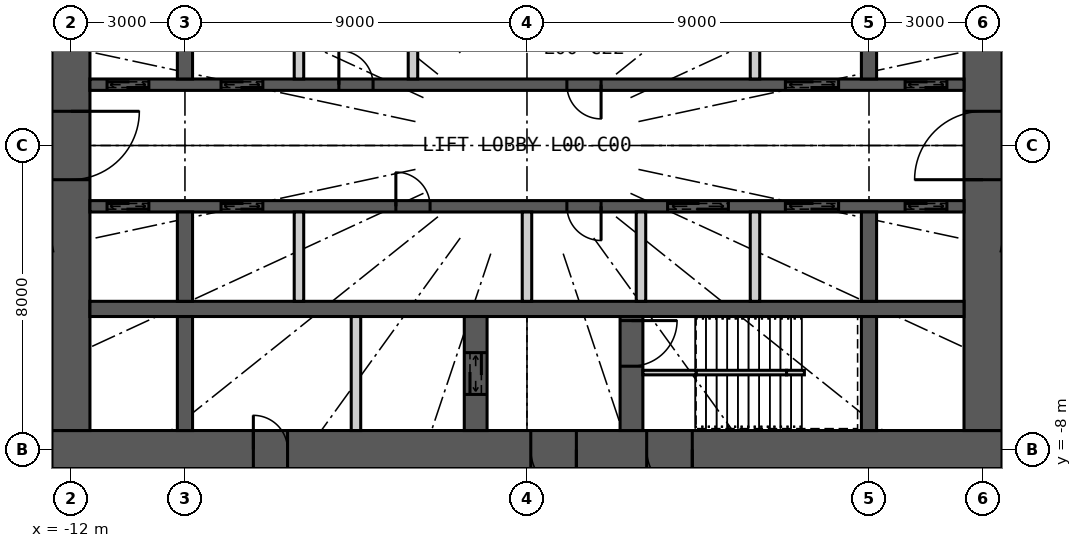
"""IFC4 building model, lengths in metres.
Left out: names, types, materials, properties, quantities, classifications, styles, units other than length and angle.
Written with IfcOpenShell. Run it as: python <this file> out.ifc"""

import sys

from ifc_helpers import new_model, si_unit, direction, frame, frame_2d, origin, place, context, subcontext, project, spatial, rectangle, extrude, element, fill, save


model = new_model("IFC4")
c1 = context("Model", 3, precision=1e-05, world=origin(), true_north=direction((0.0, 1.0)))
c2 = subcontext(c1, "Body", "Model", "MODEL_VIEW")
j1 = project(units=[si_unit("LENGTHUNIT", "METRE"), si_unit("PLANEANGLEUNIT", "RADIAN")], contexts=[c1])
p1 = place(None, origin())
s1 = spatial("IfcSite", under=j1, at=p1, CompositionType="ELEMENT")
p2 = place(p1, origin())
s2 = spatial("IfcBuilding", under=s1, at=p2, CompositionType="ELEMENT")
p3 = place(p2, origin())
s3 = spatial("IfcBuildingStorey", under=s2, at=p3, CompositionType="ELEMENT", Elevation=0.0)
p4 = place(p3, frame((12.5, -8.0, 0.0), z_axis=(0.0, 0.0, 1.0), x_axis=(-1.0, 0.0, 0.0)))
e1 = element("IfcWall", 1, at=p4, inside=s3, PredefinedType="SHEAR", context=c2, shape_type="SweptSolid", body=[
    extrude(rectangle(XDim=25.0, YDim=1.0, at=frame_2d((12.5, 0.0))), origin(), (0.0, 0.0, 1.0), 7.2),
])
p5 = place(p4, frame((11.2, 0.0, 0.0)))
e2 = element("IfcOpeningElement", 2, at=p5, cuts=e1, PredefinedType="OPENING", context=c2, shape_type="SweptSolid", body=[
    extrude(rectangle(XDim=1.2, YDim=2.2, at=frame_2d((0.6, 1.1))), frame((0.0, 0.51, 0.0), z_axis=(0.0, -1.0, 0.0), x_axis=(1.0, 0.0, 0.0)), (0.0, 0.0, 1.0), 1.02),
])
p6 = place(p4, frame((8.15, 0.0, 0.0)))
e3 = element("IfcOpeningElement", 3, at=p6, cuts=e1, PredefinedType="OPENING", context=c2, shape_type="SweptSolid", body=[
    extrude(rectangle(XDim=1.2, YDim=2.2, at=frame_2d((0.6, 1.1))), frame((0.0, 0.51, 0.0), z_axis=(0.0, -1.0, 0.0), x_axis=(1.0, 0.0, 0.0)), (0.0, 0.0, 1.0), 1.02),
])
p7 = place(p4, frame((18.8, 0.0, 0.0)))
e4 = element("IfcOpeningElement", 4, at=p7, cuts=e1, PredefinedType="OPENING", context=c2, shape_type="SweptSolid", body=[
    extrude(rectangle(XDim=0.9, YDim=2.2, at=frame_2d((0.45, 1.1))), frame((0.0, 0.51, 0.0), z_axis=(0.0, -1.0, 0.0), x_axis=(1.0, 0.0, 0.0)), (0.0, 0.0, 1.0), 1.02),
])
p8 = place(p3, frame((12.0, -7.5, 0.0), z_axis=(0.0, 0.0, 1.0), x_axis=(0.0, 1.0, 0.0)))
e5 = element("IfcWall", 5, at=p8, inside=s3, PredefinedType="SHEAR", context=c2, shape_type="SweptSolid", body=[
    extrude(rectangle(XDim=15.0, YDim=1.0, at=frame_2d((7.5, 0.0))), origin(), (0.0, 0.0, 1.0), 7.2),
])
p9 = place(p8, frame((6.6, 0.0, 0.0)))
e6 = element("IfcOpeningElement", 6, at=p9, cuts=e5, PredefinedType="OPENING", context=c2, shape_type="SweptSolid", body=[
    extrude(rectangle(XDim=1.8, YDim=2.2, at=frame_2d((0.9, 1.1))), frame((0.0, 0.51, 0.0), z_axis=(0.0, -1.0, 0.0), x_axis=(1.0, 0.0, 0.0)), (0.0, 0.0, 1.0), 1.02),
])
p10 = place(p3, frame((-12.0, 7.5, 0.0), z_axis=(0.0, 0.0, 1.0), x_axis=(0.0, -1.0, 0.0)))
e7 = element("IfcWall", 7, at=p10, inside=s3, PredefinedType="SHEAR", context=c2, shape_type="SweptSolid", body=[
    extrude(rectangle(XDim=15.0, YDim=1.0, at=frame_2d((7.5, 0.0))), origin(), (0.0, 0.0, 1.0), 7.2),
])
p11 = place(p10, frame((6.6, 0.0, 0.0)))
e8 = element("IfcOpeningElement", 8, at=p11, cuts=e7, PredefinedType="OPENING", context=c2, shape_type="SweptSolid", body=[
    extrude(rectangle(XDim=1.8, YDim=2.2, at=frame_2d((0.9, 1.1))), frame((0.0, 0.51, 0.0), z_axis=(0.0, -1.0, 0.0), x_axis=(1.0, 0.0, 0.0)), (0.0, 0.0, 1.0), 1.02),
])
p12 = place(p3, frame((-11.5, 1.6, 0.0), z_axis=(0.0, 0.0, 1.0), x_axis=(1.0, 0.0, 0.0)))
e9 = element("IfcWall", 9, at=p12, inside=s3, PredefinedType="SHEAR", context=c2, shape_type="SweptSolid", body=[
    extrude(rectangle(XDim=23.0, YDim=0.3, at=frame_2d((11.5, 0.0))), origin(), (0.0, 0.0, 1.0), 7.2),
])
p13 = place(p12, frame((0.45, 0.0, 0.0)))
e10 = element("IfcOpeningElement", 10, at=p13, cuts=e9, PredefinedType="OPENING", context=c2, shape_type="SweptSolid", body=[
    extrude(rectangle(XDim=1.1, YDim=2.2, at=frame_2d((0.55, 1.1))), frame((0.0, 0.16, 0.0), z_axis=(0.0, -1.0, 0.0), x_axis=(1.0, 0.0, 0.0)), (0.0, 0.0, 1.0), 0.32),
])
p14 = place(p12, frame((3.45, 0.0, 0.0)))
e11 = element("IfcOpeningElement", 11, at=p14, cuts=e9, PredefinedType="OPENING", context=c2, shape_type="SweptSolid", body=[
    extrude(rectangle(XDim=1.1, YDim=2.2, at=frame_2d((0.55, 1.1))), frame((0.0, 0.16, 0.0), z_axis=(0.0, -1.0, 0.0), x_axis=(1.0, 0.0, 0.0)), (0.0, 0.0, 1.0), 0.32),
])
p15 = place(p12, frame((18.3, 0.0, 0.0)))
e12 = element("IfcOpeningElement", 12, at=p15, cuts=e9, PredefinedType="OPENING", context=c2, shape_type="SweptSolid", body=[
    extrude(rectangle(XDim=1.4, YDim=2.4, at=frame_2d((0.7, 1.2))), frame((0.0, 0.16, 0.0), z_axis=(0.0, -1.0, 0.0), x_axis=(1.0, 0.0, 0.0)), (0.0, 0.0, 1.0), 0.32),
])
p16 = place(p12, frame((21.45, 0.0, 0.0)))
e13 = element("IfcOpeningElement", 13, at=p16, cuts=e9, PredefinedType="OPENING", context=c2, shape_type="SweptSolid", body=[
    extrude(rectangle(XDim=1.1, YDim=2.2, at=frame_2d((0.55, 1.1))), frame((0.0, 0.16, 0.0), z_axis=(0.0, -1.0, 0.0), x_axis=(1.0, 0.0, 0.0)), (0.0, 0.0, 1.0), 0.32),
])
p17 = place(p12, frame((6.55, 0.0, 0.0)))
e14 = element("IfcOpeningElement", 14, at=p17, cuts=e9, PredefinedType="OPENING", context=c2, shape_type="SweptSolid", body=[
    extrude(rectangle(XDim=0.9, YDim=2.2, at=frame_2d((0.45, 1.1))), frame((0.0, 0.16, 0.0), z_axis=(0.0, -1.0, 0.0), x_axis=(1.0, 0.0, 0.0)), (0.0, 0.0, 1.0), 0.32),
])
p18 = place(p12, frame((12.55, 0.0, 0.0)))
e15 = element("IfcOpeningElement", 15, at=p18, cuts=e9, PredefinedType="OPENING", context=c2, shape_type="SweptSolid", body=[
    extrude(rectangle(XDim=0.9, YDim=2.2, at=frame_2d((0.45, 1.1))), frame((0.0, 0.16, 0.0), z_axis=(0.0, -1.0, 0.0), x_axis=(1.0, 0.0, 0.0)), (0.0, 0.0, 1.0), 0.32),
])
p19 = place(p3, frame((-11.5, -4.3, 0.0), z_axis=(0.0, 0.0, 1.0), x_axis=(1.0, 0.0, 0.0)))
e16 = element("IfcWall", 16, at=p19, inside=s3, PredefinedType="SHEAR", context=c2, shape_type="SweptSolid", body=[
    extrude(rectangle(XDim=23.0, YDim=0.4, at=frame_2d((11.5, 0.0))), origin(), (0.0, 0.0, 1.0), 7.2),
])
p20 = place(p3, frame((-11.5, -1.6, 0.0), z_axis=(0.0, 0.0, 1.0), x_axis=(1.0, 0.0, 0.0)))
e17 = element("IfcWall", 17, at=p20, inside=s3, PredefinedType="SHEAR", context=c2, shape_type="SweptSolid", body=[
    extrude(rectangle(XDim=23.0, YDim=0.3, at=frame_2d((11.5, 0.0))), origin(), (0.0, 0.0, 1.0), 7.2),
])
p21 = place(p20, frame((0.45, 0.0, 0.0)))
e18 = element("IfcOpeningElement", 18, at=p21, cuts=e17, PredefinedType="OPENING", context=c2, shape_type="SweptSolid", body=[
    extrude(rectangle(XDim=1.1, YDim=2.2, at=frame_2d((0.55, 1.1))), frame((0.0, 0.16, 0.0), z_axis=(0.0, -1.0, 0.0), x_axis=(1.0, 0.0, 0.0)), (0.0, 0.0, 1.0), 0.32),
])
p22 = place(p20, frame((3.45, 0.0, 0.0)))
e19 = element("IfcOpeningElement", 19, at=p22, cuts=e17, PredefinedType="OPENING", context=c2, shape_type="SweptSolid", body=[
    extrude(rectangle(XDim=1.1, YDim=2.2, at=frame_2d((0.55, 1.1))), frame((0.0, 0.16, 0.0), z_axis=(0.0, -1.0, 0.0), x_axis=(1.0, 0.0, 0.0)), (0.0, 0.0, 1.0), 0.32),
])
p23 = place(p20, frame((15.2, 0.0, 0.0)))
e20 = element("IfcOpeningElement", 20, at=p23, cuts=e17, PredefinedType="OPENING", context=c2, shape_type="SweptSolid", body=[
    extrude(rectangle(XDim=1.6, YDim=2.4, at=frame_2d((0.8, 1.2))), frame((0.0, 0.16, 0.0), z_axis=(0.0, -1.0, 0.0), x_axis=(1.0, 0.0, 0.0)), (0.0, 0.0, 1.0), 0.32),
])
p24 = place(p20, frame((18.3, 0.0, 0.0)))
e21 = element("IfcOpeningElement", 21, at=p24, cuts=e17, PredefinedType="OPENING", context=c2, shape_type="SweptSolid", body=[
    extrude(rectangle(XDim=1.4, YDim=2.4, at=frame_2d((0.7, 1.2))), frame((0.0, 0.16, 0.0), z_axis=(0.0, -1.0, 0.0), x_axis=(1.0, 0.0, 0.0)), (0.0, 0.0, 1.0), 0.32),
])
p25 = place(p20, frame((21.45, 0.0, 0.0)))
e22 = element("IfcOpeningElement", 22, at=p25, cuts=e17, PredefinedType="OPENING", context=c2, shape_type="SweptSolid", body=[
    extrude(rectangle(XDim=1.1, YDim=2.2, at=frame_2d((0.55, 1.1))), frame((0.0, 0.16, 0.0), z_axis=(0.0, -1.0, 0.0), x_axis=(1.0, 0.0, 0.0)), (0.0, 0.0, 1.0), 0.32),
])
p26 = place(p20, frame((8.05, 0.0, 0.0)))
e23 = element("IfcOpeningElement", 23, at=p26, cuts=e17, PredefinedType="OPENING", context=c2, shape_type="SweptSolid", body=[
    extrude(rectangle(XDim=0.9, YDim=2.2, at=frame_2d((0.45, 1.1))), frame((0.0, 0.16, 0.0), z_axis=(0.0, -1.0, 0.0), x_axis=(1.0, 0.0, 0.0)), (0.0, 0.0, 1.0), 0.32),
])
p27 = place(p20, frame((12.55, 0.0, 0.0)))
e24 = element("IfcOpeningElement", 24, at=p27, cuts=e17, PredefinedType="OPENING", context=c2, shape_type="SweptSolid", body=[
    extrude(rectangle(XDim=0.9, YDim=2.2, at=frame_2d((0.45, 1.1))), frame((0.0, 0.16, 0.0), z_axis=(0.0, -1.0, 0.0), x_axis=(1.0, 0.0, 0.0)), (0.0, 0.0, 1.0), 0.32),
])
for number, where, z_axis, x_axis in (
    (25, (-9.0, 1.75, 0.0), (0.0, 0.0, 1.0), (0.0, 1.0, 0.0)),
    (26, (-9.0, -4.1, 0.0), (0.0, 0.0, 1.0), (0.0, 1.0, 0.0)),
):
    element("IfcWall", number, at=place(p3, frame(where, z_axis=z_axis, x_axis=x_axis)), inside=s3, PredefinedType="SHEAR", context=c2, shape_type="SweptSolid", body=[
        extrude(rectangle(XDim=2.35, YDim=0.4, at=frame_2d((1.175, 0.0))), origin(), (0.0, 0.0, 1.0), 7.2),
    ])
p28 = place(p3, frame((-9.0, -7.5, 0.0), z_axis=(0.0, 0.0, 1.0), x_axis=(0.0, 1.0, 0.0)))
e27 = element("IfcWall", 27, at=p28, inside=s3, PredefinedType="SHEAR", context=c2, shape_type="SweptSolid", body=[
    extrude(rectangle(XDim=3.0, YDim=0.4, at=frame_2d((1.5, 0.0))), origin(), (0.0, 0.0, 1.0), 7.2),
])
for number, where, z_axis, x_axis in (
    (28, (9.0, 1.75, 0.0), (0.0, 0.0, 1.0), (0.0, 1.0, 0.0)),
    (29, (9.0, -4.1, 0.0), (0.0, 0.0, 1.0), (0.0, 1.0, 0.0)),
):
    element("IfcWall", number, at=place(p3, frame(where, z_axis=z_axis, x_axis=x_axis)), inside=s3, PredefinedType="SHEAR", context=c2, shape_type="SweptSolid", body=[
        extrude(rectangle(XDim=2.35, YDim=0.4, at=frame_2d((1.175, 0.0))), origin(), (0.0, 0.0, 1.0), 7.2),
    ])
p29 = place(p3, frame((9.0, -7.5, 0.0), z_axis=(0.0, 0.0, 1.0), x_axis=(0.0, 1.0, 0.0)))
e30 = element("IfcWall", 30, at=p29, inside=s3, PredefinedType="SHEAR", context=c2, shape_type="SweptSolid", body=[
    extrude(rectangle(XDim=3.0, YDim=0.4, at=frame_2d((1.5, 0.0))), origin(), (0.0, 0.0, 1.0), 7.2),
])
p30 = place(p3, frame((2.75, -7.5, 0.0), z_axis=(0.0, 0.0, 1.0), x_axis=(0.0, 1.0, 0.0)))
e31 = element("IfcWall", 31, at=p30, inside=s3, PredefinedType="SHEAR", context=c2, shape_type="SweptSolid", body=[
    extrude(rectangle(XDim=3.0, YDim=0.6, at=frame_2d((1.5, 0.0))), origin(), (0.0, 0.0, 1.0), 7.2),
])
p31 = place(p30, frame((1.692, 0.0, 0.0)))
e32 = element("IfcOpeningElement", 32, at=p31, cuts=e31, PredefinedType="OPENING", context=c2, shape_type="SweptSolid", body=[
    extrude(rectangle(XDim=1.2, YDim=2.2, at=frame_2d((0.6, 1.1))), frame((0.0, 0.31, 0.0), z_axis=(0.0, -1.0, 0.0), x_axis=(1.0, 0.0, 0.0)), (0.0, 0.0, 1.0), 0.62),
])
p32 = place(p3, frame((-1.35, -7.5, 0.0), z_axis=(0.0, 0.0, 1.0), x_axis=(0.0, 1.0, 0.0)))
e33 = element("IfcWall", 33, at=p32, inside=s3, PredefinedType="SHEAR", context=c2, shape_type="SweptSolid", body=[
    extrude(rectangle(XDim=3.0, YDim=0.6, at=frame_2d((1.5, 0.0))), origin(), (0.0, 0.0, 1.0), 7.2),
])
p33 = place(p32, frame((0.95, 0.0, 0.0)))
e34 = element("IfcOpeningElement", 34, at=p33, cuts=e33, PredefinedType="OPENING", context=c2, shape_type="SweptSolid", body=[
    extrude(rectangle(XDim=1.1, YDim=2.2, at=frame_2d((0.55, 1.1))), frame((0.0, 0.31, 0.0), z_axis=(0.0, -1.0, 0.0), x_axis=(1.0, 0.0, 0.0)), (0.0, 0.0, 1.0), 0.62),
])
p34 = place(p3, frame((-4.5, -7.5, 0.0), z_axis=(0.0, 0.0, 1.0), x_axis=(0.0, 1.0, 0.0)))
e35 = element("IfcWall", 35, at=p34, inside=s3, PredefinedType="PARTITIONING", context=c2, shape_type="SweptSolid", body=[
    extrude(rectangle(XDim=3.0, YDim=0.25, at=frame_2d((1.5, 0.0))), origin(), (0.0, 0.0, 1.0), 7.2),
])
for number, where, z_axis, x_axis in (
    (36, (-6.0, 1.75, 0.0), (0.0, 0.0, 1.0), (0.0, 1.0, 0.0)),
    (37, (-3.0, 1.75, 0.0), (0.0, 0.0, 1.0), (0.0, 1.0, 0.0)),
    (38, (6.0, 1.75, 0.0), (0.0, 0.0, 1.0), (0.0, 1.0, 0.0)),
    (39, (-6.0, -4.1, 0.0), (0.0, 0.0, 1.0), (0.0, 1.0, 0.0)),
    (40, (0.0, -4.1, 0.0), (0.0, 0.0, 1.0), (0.0, 1.0, 0.0)),
    (41, (3.0, -4.1, 0.0), (0.0, 0.0, 1.0), (0.0, 1.0, 0.0)),
    (42, (6.0, -4.1, 0.0), (0.0, 0.0, 1.0), (0.0, 1.0, 0.0)),
):
    element("IfcWall", number, at=place(p3, frame(where, z_axis=z_axis, x_axis=x_axis)), inside=s3, PredefinedType="PARTITIONING", context=c2, shape_type="SweptSolid", body=[
        extrude(rectangle(XDim=2.35, YDim=0.25, at=frame_2d((1.175, 0.0))), origin(), (0.0, 0.0, 1.0), 7.2),
    ])
p35 = place(p3, frame((-18.9, -4.052, 0.0), z_axis=(0.0, 0.0, 1.0), x_axis=(0.977781666858, 0.2096258857, 0.0)))
e43 = element("IfcWall", 43, at=p35, inside=s3, PredefinedType="PARTITIONING", context=c2, shape_type="SweptSolid", body=[
    extrude(rectangle(XDim=6.545, YDim=0.2, at=frame_2d((3.273, 0.0))), origin(), (0.0, 0.0, 1.0), 6.95),
])
p36 = place(p35, frame((2.373, 0.0, 0.0)))
e44 = element("IfcOpeningElement", 44, at=p36, cuts=e43, PredefinedType="OPENING", context=c2, shape_type="SweptSolid", body=[
    extrude(rectangle(XDim=1.8, YDim=2.4, at=frame_2d((0.9, 1.2))), frame((0.0, 0.11, 0.0), z_axis=(0.0, -1.0, 0.0), x_axis=(1.0, 0.0, 0.0)), (0.0, 0.0, 1.0), 0.22),
])
p37 = place(p3, frame((18.9, -4.052, 0.0), z_axis=(0.0, 0.0, 1.0), x_axis=(-0.977781666858, 0.2096258857, 0.0)))
e45 = element("IfcWall", 45, at=p37, inside=s3, PredefinedType="PARTITIONING", context=c2, shape_type="SweptSolid", body=[
    extrude(rectangle(XDim=6.545, YDim=0.2, at=frame_2d((3.273, 0.0))), origin(), (0.0, 0.0, 1.0), 6.95),
])
p38 = place(p37, frame((2.373, 0.0, 0.0)))
e46 = element("IfcOpeningElement", 46, at=p38, cuts=e45, PredefinedType="OPENING", context=c2, shape_type="SweptSolid", body=[
    extrude(rectangle(XDim=1.8, YDim=2.4, at=frame_2d((0.9, 1.2))), frame((0.0, 0.11, 0.0), z_axis=(0.0, -1.0, 0.0), x_axis=(1.0, 0.0, 0.0)), (0.0, 0.0, 1.0), 0.22),
])
p39 = place(p3, frame((6.83, -5.975, -0.5), z_axis=(0.0, 0.0, 1.0), x_axis=(-1.0, 0.0, 0.0)))
e47 = element("IfcWall", 47, at=p39, inside=s3, PredefinedType="PARTITIONING", context=c2, shape_type="SweptSolid", body=[
    extrude(rectangle(XDim=2.38, YDim=0.12, at=frame_2d((1.19, 0.0))), origin(), (0.0, 0.0, 1.0), 4.3),
])
p40 = place(p3, frame((4.45, -5.975, 0.0), z_axis=(0.0, 0.0, 1.0), x_axis=(-1.0, 0.0, 0.0)))
e48 = element("IfcWall", 48, at=p40, inside=s3, PredefinedType="PARTITIONING", context=c2, shape_type="SweptSolid", body=[
    extrude(rectangle(XDim=1.4, YDim=0.12, at=frame_2d((0.7, 0.0))), origin(), (0.0, 0.0, 1.0), 3.35),
])
p41 = place(p3, frame((7.3, -5.975, 1.129), z_axis=(0.0, 0.0, 1.0), x_axis=(-1.0, 0.0, 0.0)))
e49 = element("IfcWall", 49, at=p41, inside=s3, PredefinedType="PARTITIONING", context=c2, shape_type="SweptSolid", body=[
    extrude(rectangle(XDim=0.47, YDim=0.12, at=frame_2d((0.235, 0.0))), origin(), (0.0, 0.0, 1.0), 2.671),
])
p42 = place(p5, origin())
e50 = element("IfcDoor", 50, at=p42, inside=s3, OperationType="SINGLE_SWING_LEFT", PredefinedType="DOOR", context=c2, shape_type="SweptSolid", body=[
    extrude(rectangle(XDim=1.2, YDim=2.2, at=frame_2d((0.6, 1.1))), frame((0.0, 0.025, 0.0), z_axis=(0.0, -1.0, 0.0), x_axis=(1.0, 0.0, 0.0)), (0.0, 0.0, 1.0), 0.05),
])
fill(e2, e50)
p43 = place(p31, origin())
e51 = element("IfcDoor", 51, at=p43, inside=s3, OperationType="SINGLE_SWING_RIGHT", PredefinedType="DOOR", context=c2, shape_type="SweptSolid", body=[
    extrude(rectangle(XDim=1.2, YDim=2.2, at=frame_2d((0.6, 1.1))), frame((0.0, 0.025, 0.0), z_axis=(0.0, -1.0, 0.0), x_axis=(1.0, 0.0, 0.0)), (0.0, 0.0, 1.0), 0.05),
])
fill(e32, e51)
p44 = place(p6, origin())
e52 = element("IfcDoor", 52, at=p44, inside=s3, OperationType="SINGLE_SWING_LEFT", PredefinedType="DOOR", context=c2, shape_type="SweptSolid", body=[
    extrude(rectangle(XDim=1.2, YDim=2.2, at=frame_2d((0.6, 1.1))), frame((0.0, 0.025, 0.0), z_axis=(0.0, -1.0, 0.0), x_axis=(1.0, 0.0, 0.0)), (0.0, 0.0, 1.0), 0.05),
])
fill(e3, e52)
p45 = place(p33, origin())
e53 = element("IfcDoor", 53, at=p45, inside=s3, OperationType="DOUBLE_DOOR_SLIDING", PredefinedType="DOOR", context=c2, shape_type="SweptSolid", body=[
    extrude(rectangle(XDim=1.1, YDim=2.2, at=frame_2d((0.55, 1.1))), frame((0.0, 0.025, 0.0), z_axis=(0.0, -1.0, 0.0), x_axis=(1.0, 0.0, 0.0)), (0.0, 0.0, 1.0), 0.05),
])
fill(e34, e53)
p46 = place(p7, origin())
e54 = element("IfcDoor", 54, at=p46, inside=s3, OperationType="SINGLE_SWING_RIGHT", PredefinedType="DOOR", context=c2, shape_type="SweptSolid", body=[
    extrude(rectangle(XDim=0.9, YDim=2.2, at=frame_2d((0.45, 1.1))), frame((0.0, 0.025, 0.0), z_axis=(0.0, -1.0, 0.0), x_axis=(1.0, 0.0, 0.0)), (0.0, 0.0, 1.0), 0.05),
])
fill(e4, e54)
p47 = place(p13, origin())
e55 = element("IfcDoor", 55, at=p47, inside=s3, OperationType="DOUBLE_DOOR_SLIDING", PredefinedType="DOOR", context=c2, shape_type="SweptSolid", body=[
    extrude(rectangle(XDim=1.1, YDim=2.2, at=frame_2d((0.55, 1.1))), frame((0.0, 0.025, 0.0), z_axis=(0.0, -1.0, 0.0), x_axis=(1.0, 0.0, 0.0)), (0.0, 0.0, 1.0), 0.05),
])
fill(e10, e55)
p48 = place(p14, origin())
e56 = element("IfcDoor", 56, at=p48, inside=s3, OperationType="DOUBLE_DOOR_SLIDING", PredefinedType="DOOR", context=c2, shape_type="SweptSolid", body=[
    extrude(rectangle(XDim=1.1, YDim=2.2, at=frame_2d((0.55, 1.1))), frame((0.0, 0.025, 0.0), z_axis=(0.0, -1.0, 0.0), x_axis=(1.0, 0.0, 0.0)), (0.0, 0.0, 1.0), 0.05),
])
fill(e11, e56)
p49 = place(p15, origin())
e57 = element("IfcDoor", 57, at=p49, inside=s3, OperationType="DOUBLE_DOOR_SLIDING", PredefinedType="DOOR", context=c2, shape_type="SweptSolid", body=[
    extrude(rectangle(XDim=1.4, YDim=2.4, at=frame_2d((0.7, 1.2))), frame((0.0, 0.025, 0.0), z_axis=(0.0, -1.0, 0.0), x_axis=(1.0, 0.0, 0.0)), (0.0, 0.0, 1.0), 0.05),
])
fill(e12, e57)
p50 = place(p16, origin())
e58 = element("IfcDoor", 58, at=p50, inside=s3, OperationType="DOUBLE_DOOR_SLIDING", PredefinedType="DOOR", context=c2, shape_type="SweptSolid", body=[
    extrude(rectangle(XDim=1.1, YDim=2.2, at=frame_2d((0.55, 1.1))), frame((0.0, 0.025, 0.0), z_axis=(0.0, -1.0, 0.0), x_axis=(1.0, 0.0, 0.0)), (0.0, 0.0, 1.0), 0.05),
])
fill(e13, e58)
p51 = place(p21, origin())
e59 = element("IfcDoor", 59, at=p51, inside=s3, OperationType="DOUBLE_DOOR_SLIDING", PredefinedType="DOOR", context=c2, shape_type="SweptSolid", body=[
    extrude(rectangle(XDim=1.1, YDim=2.2, at=frame_2d((0.55, 1.1))), frame((0.0, 0.025, 0.0), z_axis=(0.0, -1.0, 0.0), x_axis=(1.0, 0.0, 0.0)), (0.0, 0.0, 1.0), 0.05),
])
fill(e18, e59)
p52 = place(p22, origin())
e60 = element("IfcDoor", 60, at=p52, inside=s3, OperationType="DOUBLE_DOOR_SLIDING", PredefinedType="DOOR", context=c2, shape_type="SweptSolid", body=[
    extrude(rectangle(XDim=1.1, YDim=2.2, at=frame_2d((0.55, 1.1))), frame((0.0, 0.025, 0.0), z_axis=(0.0, -1.0, 0.0), x_axis=(1.0, 0.0, 0.0)), (0.0, 0.0, 1.0), 0.05),
])
fill(e19, e60)
p53 = place(p23, origin())
e61 = element("IfcDoor", 61, at=p53, inside=s3, OperationType="DOUBLE_DOOR_SLIDING", PredefinedType="DOOR", context=c2, shape_type="SweptSolid", body=[
    extrude(rectangle(XDim=1.6, YDim=2.4, at=frame_2d((0.8, 1.2))), frame((0.0, 0.025, 0.0), z_axis=(0.0, -1.0, 0.0), x_axis=(1.0, 0.0, 0.0)), (0.0, 0.0, 1.0), 0.05),
])
fill(e20, e61)
p54 = place(p24, origin())
e62 = element("IfcDoor", 62, at=p54, inside=s3, OperationType="DOUBLE_DOOR_SLIDING", PredefinedType="DOOR", context=c2, shape_type="SweptSolid", body=[
    extrude(rectangle(XDim=1.4, YDim=2.4, at=frame_2d((0.7, 1.2))), frame((0.0, 0.025, 0.0), z_axis=(0.0, -1.0, 0.0), x_axis=(1.0, 0.0, 0.0)), (0.0, 0.0, 1.0), 0.05),
])
fill(e21, e62)
p55 = place(p25, origin())
e63 = element("IfcDoor", 63, at=p55, inside=s3, OperationType="DOUBLE_DOOR_SLIDING", PredefinedType="DOOR", context=c2, shape_type="SweptSolid", body=[
    extrude(rectangle(XDim=1.1, YDim=2.2, at=frame_2d((0.55, 1.1))), frame((0.0, 0.025, 0.0), z_axis=(0.0, -1.0, 0.0), x_axis=(1.0, 0.0, 0.0)), (0.0, 0.0, 1.0), 0.05),
])
fill(e22, e63)
p56 = place(p17, origin())
e64 = element("IfcDoor", 64, at=p56, inside=s3, OperationType="SINGLE_SWING_LEFT", PredefinedType="DOOR", context=c2, shape_type="SweptSolid", body=[
    extrude(rectangle(XDim=0.9, YDim=2.2, at=frame_2d((0.45, 1.1))), frame((0.0, 0.025, 0.0), z_axis=(0.0, -1.0, 0.0), x_axis=(1.0, 0.0, 0.0)), (0.0, 0.0, 1.0), 0.05),
])
fill(e14, e64)
p57 = place(p18, origin())
e65 = element("IfcDoor", 65, at=p57, inside=s3, OperationType="SINGLE_SWING_RIGHT", PredefinedType="DOOR", context=c2, shape_type="SweptSolid", body=[
    extrude(rectangle(XDim=0.9, YDim=2.2, at=frame_2d((0.45, 1.1))), frame((0.0, 0.025, 0.0), z_axis=(0.0, -1.0, 0.0), x_axis=(1.0, 0.0, 0.0)), (0.0, 0.0, 1.0), 0.05),
])
fill(e15, e65)
p58 = place(p26, origin())
e66 = element("IfcDoor", 66, at=p58, inside=s3, OperationType="SINGLE_SWING_LEFT", PredefinedType="DOOR", context=c2, shape_type="SweptSolid", body=[
    extrude(rectangle(XDim=0.9, YDim=2.2, at=frame_2d((0.45, 1.1))), frame((0.0, 0.025, 0.0), z_axis=(0.0, -1.0, 0.0), x_axis=(1.0, 0.0, 0.0)), (0.0, 0.0, 1.0), 0.05),
])
fill(e23, e66)
p59 = place(p27, origin())
e67 = element("IfcDoor", 67, at=p59, inside=s3, OperationType="SINGLE_SWING_RIGHT", PredefinedType="DOOR", context=c2, shape_type="SweptSolid", body=[
    extrude(rectangle(XDim=0.9, YDim=2.2, at=frame_2d((0.45, 1.1))), frame((0.0, 0.025, 0.0), z_axis=(0.0, -1.0, 0.0), x_axis=(1.0, 0.0, 0.0)), (0.0, 0.0, 1.0), 0.05),
])
fill(e24, e67)
p60 = place(p9, origin())
e68 = element("IfcDoor", 68, at=p60, inside=s3, OperationType="DOUBLE_DOOR_DOUBLE_SWING", PredefinedType="DOOR", context=c2, shape_type="SweptSolid", body=[
    extrude(rectangle(XDim=1.8, YDim=2.2, at=frame_2d((0.9, 1.1))), frame((0.0, 0.025, 0.0), z_axis=(0.0, -1.0, 0.0), x_axis=(1.0, 0.0, 0.0)), (0.0, 0.0, 1.0), 0.05),
])
fill(e6, e68)
p61 = place(p11, origin())
e69 = element("IfcDoor", 69, at=p61, inside=s3, OperationType="DOUBLE_DOOR_DOUBLE_SWING", PredefinedType="DOOR", context=c2, shape_type="SweptSolid", body=[
    extrude(rectangle(XDim=1.8, YDim=2.2, at=frame_2d((0.9, 1.1))), frame((0.0, 0.025, 0.0), z_axis=(0.0, -1.0, 0.0), x_axis=(1.0, 0.0, 0.0)), (0.0, 0.0, 1.0), 0.05),
])
fill(e8, e69)
save(model, sys.argv[1])
